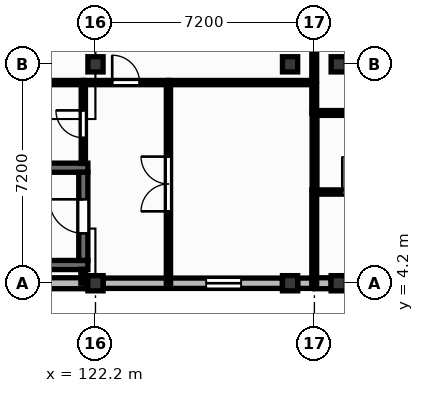
"""IFC4 building model, lengths in metres.
Left out: names, types, materials, properties, quantities, classifications, styles, units other than length and angle.
Written with IfcOpenShell. Run it as: python <this file> out.ifc"""

import sys

from ifc_helpers import new_model, si_unit, direction, frame, frame_2d, origin, origin_2d, place, context, subcontext, project, spatial, rectangle, extrude, element, fill, save


model = new_model("IFC4")
c1 = context("Model", 3, precision=1e-05, world=origin(), true_north=direction((0.0, 1.0)))
c2 = subcontext(c1, "Body", "Model", "MODEL_VIEW")
j1 = project(units=[si_unit("LENGTHUNIT", "METRE"), si_unit("PLANEANGLEUNIT", "RADIAN")], contexts=[c1])
p1 = place(None, origin())
s1 = spatial("IfcSite", under=j1, at=p1, CompositionType="ELEMENT")
p2 = place(p1, origin())
s2 = spatial("IfcBuilding", under=s1, at=p2, CompositionType="ELEMENT")
p3 = place(p2, frame((0.0, 0.0, 4.5)))
s3 = spatial("IfcBuildingStorey", under=s2, at=p3, CompositionType="ELEMENT", Elevation=4.5)
for number, where, z_axis, x_axis in (
    (1, (122.2, 4.2, 0.0), (0.0, 0.0, 1.0), (1.0, 0.0, 0.0)),
    (2, (122.2, 11.4, 0.0), (0.0, 0.0, 1.0), (1.0, 0.0, 0.0)),
    (3, (128.6, 4.2, 0.0), (0.0, 0.0, 1.0), (1.0, 0.0, 0.0)),
    (4, (128.6, 11.4, 0.0), (0.0, 0.0, 1.0), (1.0, 0.0, 0.0)),
    (5, (130.2, 4.2, 0.0), (0.0, 0.0, 1.0), (1.0, 0.0, 0.0)),
    (6, (130.2, 11.4, 0.0), (0.0, 0.0, 1.0), (1.0, 0.0, 0.0)),
):
    element("IfcColumn", number, at=place(p3, frame(where, z_axis=z_axis, x_axis=x_axis)), inside=s3, PredefinedType="COLUMN", context=c2, shape_type="SweptSolid", body=[
        extrude(rectangle(XDim=0.5, YDim=0.5, at=origin_2d()), origin(), (0.0, 0.0, 1.0), 4.22),
    ])
p4 = place(p3, frame((115.25, 4.2, 0.0), z_axis=(0.0, 0.0, 1.0), x_axis=(1.0, 0.0, 0.0)))
e7 = element("IfcWall", 7, at=p4, inside=s3, PredefinedType="SOLIDWALL", context=c2, shape_type="SweptSolid", body=[
    extrude(rectangle(XDim=6.7, YDim=0.36, at=frame_2d((3.35, 0.0))), origin(), (0.0, 0.0, 1.0), 3.52),
])
p5 = place(p3, frame((122.45, 4.2, 0.0), z_axis=(0.0, 0.0, 1.0), x_axis=(1.0, 0.0, 0.0)))
e8 = element("IfcWall", 8, at=p5, inside=s3, PredefinedType="SOLIDWALL", context=c2, shape_type="SweptSolid", body=[
    extrude(rectangle(XDim=5.9, YDim=0.34, at=frame_2d((2.95, 0.0))), origin(), (0.0, 0.0, 1.0), 3.52),
])
p6 = place(p5, frame((3.39, 0.0, 1.5)))
e9 = element("IfcOpeningElement", 9, at=p6, cuts=e8, PredefinedType="OPENING", context=c2, shape_type="SweptSolid", body=[
    extrude(rectangle(XDim=1.15, YDim=1.25, at=frame_2d((0.575, 0.625))), frame((0.0, 0.18, 0.0), z_axis=(0.0, -1.0, 0.0), x_axis=(1.0, 0.0, 0.0)), (0.0, 0.0, 1.0), 0.36),
])
p7 = place(p3, frame((128.85, 4.2, 0.0), z_axis=(0.0, 0.0, 1.0), x_axis=(1.0, 0.0, 0.0)))
e10 = element("IfcWall", 10, at=p7, inside=s3, PredefinedType="SOLIDWALL", context=c2, shape_type="SweptSolid", body=[
    extrude(rectangle(XDim=0.485, YDim=0.34, at=frame_2d((0.242, 0.0))), origin(), (0.0, 0.0, 1.0), 4.22),
])
p8 = place(p3, frame((129.405, 4.2, 0.0), z_axis=(0.0, 0.0, 1.0), x_axis=(1.0, 0.0, 0.0)))
e11 = element("IfcWall", 11, at=p8, inside=s3, PredefinedType="SOLIDWALL", context=c2, shape_type="SweptSolid", body=[
    extrude(rectangle(XDim=0.545, YDim=0.36, at=frame_2d((0.272, 0.0))), origin(), (0.0, 0.0, 1.0), 4.22),
])
for number, where, z_axis, x_axis in (
    (12, (115.25, 4.8, 0.0), (0.0, 0.0, 1.0), (1.0, 0.0, 0.0)),
    (13, (115.25, 8.0, 0.0), (0.0, 0.0, 1.0), (1.0, 0.0, 0.0)),
):
    element("IfcWall", number, at=place(p3, frame(where, z_axis=z_axis, x_axis=x_axis)), inside=s3, PredefinedType="SHEAR", context=c2, shape_type="SweptSolid", body=[
        extrude(rectangle(XDim=6.7, YDim=0.3, at=frame_2d((3.35, 0.0))), origin(), (0.0, 0.0, 1.0), 4.25),
    ])
p9 = place(p3, frame((121.8, 4.95, 0.0), z_axis=(0.0, 0.0, 1.0), x_axis=(0.0, 1.0, 0.0)))
e14 = element("IfcWall", 14, at=p9, inside=s3, PredefinedType="SHEAR", context=c2, shape_type="SweptSolid", body=[
    extrude(rectangle(XDim=2.9, YDim=0.3, at=frame_2d((1.45, 0.0))), origin(), (0.0, 0.0, 1.0), 4.25),
])
p10 = place(p9, frame((0.89, 0.0, 0.0)))
e15 = element("IfcOpeningElement", 15, at=p10, cuts=e14, PredefinedType="OPENING", context=c2, shape_type="SweptSolid", body=[
    extrude(rectangle(XDim=1.12, YDim=2.1, at=frame_2d((0.56, 1.05))), frame((0.0, 0.16, 0.0), z_axis=(0.0, -1.0, 0.0), x_axis=(1.0, 0.0, 0.0)), (0.0, 0.0, 1.0), 0.32),
])
p11 = place(p3, frame((115.0, 10.8, 0.0), z_axis=(0.0, 0.0, 1.0), x_axis=(1.0, 0.0, 0.0)))
e16 = element("IfcWall", 16, at=p11, inside=s3, PredefinedType="PARTITIONING", context=c2, shape_type="SweptSolid", body=[
    extrude(rectangle(XDim=6.8, YDim=0.14, at=frame_2d((3.4, 0.0))), origin(), (0.0, 0.0, 1.0), 4.18),
])
p12 = place(p11, frame((2.95, 0.0, 0.0)))
e17 = element("IfcOpeningElement", 17, at=p12, cuts=e16, PredefinedType="OPENING", context=c2, shape_type="SweptSolid", body=[
    extrude(rectangle(XDim=0.9, YDim=2.1, at=frame_2d((0.45, 1.05))), frame((0.0, 0.08, 0.0), z_axis=(0.0, -1.0, 0.0), x_axis=(1.0, 0.0, 0.0)), (0.0, 0.0, 1.0), 0.16),
])
p13 = place(p3, frame((121.8, 8.14, 0.0), z_axis=(0.0, 0.0, 1.0), x_axis=(0.0, 1.0, 0.0)))
e18 = element("IfcWall", 18, at=p13, inside=s3, PredefinedType="PARTITIONING", context=c2, shape_type="SweptSolid", body=[
    extrude(rectangle(XDim=2.59, YDim=0.14, at=frame_2d((1.295, 0.0))), origin(), (0.0, 0.0, 1.0), 4.18),
])
p14 = place(p13, frame((0.845, 0.0, 0.0)))
e19 = element("IfcOpeningElement", 19, at=p14, cuts=e18, PredefinedType="OPENING", context=c2, shape_type="SweptSolid", body=[
    extrude(rectangle(XDim=0.9, YDim=2.1, at=frame_2d((0.45, 1.05))), frame((0.0, 0.08, 0.0), z_axis=(0.0, -1.0, 0.0), x_axis=(1.0, 0.0, 0.0)), (0.0, 0.0, 1.0), 0.16),
])
p15 = place(p3, frame((121.8, 10.8, 0.0), z_axis=(0.0, 0.0, 1.0), x_axis=(1.0, 0.0, 0.0)))
e20 = element("IfcWall", 20, at=p15, inside=s3, PredefinedType="PARTITIONING", context=c2, shape_type="SweptSolid", body=[
    extrude(rectangle(XDim=2.8, YDim=0.14, at=frame_2d((1.4, 0.0))), origin(), (0.0, 0.0, 1.0), 4.18),
])
p16 = place(p15, frame((0.95, 0.0, 0.0)))
e21 = element("IfcOpeningElement", 21, at=p16, cuts=e20, PredefinedType="OPENING", context=c2, shape_type="SweptSolid", body=[
    extrude(rectangle(XDim=0.9, YDim=2.1, at=frame_2d((0.45, 1.05))), frame((0.0, 0.08, 0.0), z_axis=(0.0, -1.0, 0.0), x_axis=(1.0, 0.0, 0.0)), (0.0, 0.0, 1.0), 0.16),
])
p17 = place(p3, frame((124.6, 4.2, 0.0), z_axis=(0.0, 0.0, 1.0), x_axis=(0.0, 1.0, 0.0)))
e22 = element("IfcWall", 22, at=p17, inside=s3, PredefinedType="PARTITIONING", context=c2, shape_type="SweptSolid", body=[
    extrude(rectangle(XDim=6.53, YDim=0.14, at=frame_2d((3.265, 0.0))), origin(), (0.0, 0.0, 1.0), 4.18),
])
p18 = place(p17, frame((2.365, 0.0, 0.0)))
e23 = element("IfcOpeningElement", 23, at=p18, cuts=e22, PredefinedType="OPENING", context=c2, shape_type="SweptSolid", body=[
    extrude(rectangle(XDim=1.8, YDim=2.3, at=frame_2d((0.9, 1.15))), frame((0.0, 0.08, 0.0), z_axis=(0.0, -1.0, 0.0), x_axis=(1.0, 0.0, 0.0)), (0.0, 0.0, 1.0), 0.16),
])
p19 = place(p3, frame((124.6, 10.8, 0.0), z_axis=(0.0, 0.0, 1.0), x_axis=(1.0, 0.0, 0.0)))
e24 = element("IfcWall", 24, at=p19, inside=s3, PredefinedType="PARTITIONING", context=c2, shape_type="SweptSolid", body=[
    extrude(rectangle(XDim=4.795, YDim=0.14, at=frame_2d((2.397, 0.0))), origin(), (0.0, 0.0, 1.0), 4.18),
])
p20 = place(p3, frame((129.405, 7.2, 0.0), z_axis=(0.0, 0.0, 1.0), x_axis=(1.0, 0.0, 0.0)))
e25 = element("IfcWall", 25, at=p20, inside=s3, PredefinedType="PARTITIONING", context=c2, shape_type="SweptSolid", body=[
    extrude(rectangle(XDim=2.986, YDim=0.14, at=frame_2d((1.493, 0.0))), origin(), (0.0, 0.0, 1.0), 4.18),
])
p21 = place(p20, frame((0.913, 0.0, 0.0)))
e26 = element("IfcOpeningElement", 26, at=p21, cuts=e25, PredefinedType="OPENING", context=c2, shape_type="SweptSolid", body=[
    extrude(rectangle(XDim=1.16, YDim=2.1, at=frame_2d((0.58, 1.05))), frame((0.0, 0.08, 0.0), z_axis=(0.0, -1.0, 0.0), x_axis=(1.0, 0.0, 0.0)), (0.0, 0.0, 1.0), 0.16),
])
p22 = place(p3, frame((129.395, 10.87, 0.0), z_axis=(0.0, 0.0, 1.0), x_axis=(0.0, 1.0, 0.0)))
e27 = element("IfcWall", 27, at=p22, inside=s3, PredefinedType="PARTITIONING", context=c2, shape_type="SweptSolid", body=[
    extrude(rectangle(XDim=2.53, YDim=0.16, at=frame_2d((1.265, 0.0))), origin(), (0.0, 0.0, 1.0), 4.18),
])
p23 = place(p3, frame((121.8, 4.2, 0.0), z_axis=(0.0, 0.0, 1.0), x_axis=(0.0, 1.0, 0.0)))
e28 = element("IfcWall", 28, at=p23, inside=s3, PredefinedType="PARTITIONING", context=c2, shape_type="SweptSolid", body=[
    extrude(rectangle(XDim=0.46, YDim=0.16, at=frame_2d((0.23, 0.0))), origin(), (0.0, 0.0, 1.0), 4.18),
])
p24 = place(p3, frame((133.8, 9.8, 0.0), z_axis=(0.0, 0.0, 1.0), x_axis=(-1.0, 0.0, 0.0)))
e29 = element("IfcWall", 29, at=p24, inside=s3, PredefinedType="PARTITIONING", context=c2, shape_type="SweptSolid", body=[
    extrude(rectangle(XDim=4.395, YDim=0.16, at=frame_2d((2.198, 0.0))), origin(), (0.0, 0.0, 1.0), 4.18),
])
p25 = place(p3, frame((129.405, 7.27, 0.0), z_axis=(0.0, 0.0, 1.0), x_axis=(0.0, 1.0, 0.0)))
e30 = element("IfcWall", 30, at=p25, inside=s3, PredefinedType="PARTITIONING", context=c2, shape_type="SweptSolid", body=[
    extrude(rectangle(XDim=2.53, YDim=0.16, at=frame_2d((1.265, 0.0))), origin(), (0.0, 0.0, 1.0), 4.18),
])
p26 = place(p3, frame((129.395, 4.2, 0.0), z_axis=(0.0, 0.0, 1.0), x_axis=(0.0, 1.0, 0.0)))
e31 = element("IfcWall", 31, at=p26, inside=s3, PredefinedType="PARTITIONING", context=c2, shape_type="SweptSolid", body=[
    extrude(rectangle(XDim=3.07, YDim=0.16, at=frame_2d((1.535, 0.0))), origin(), (0.0, 0.0, 1.0), 4.18),
])
p27 = place(p3, frame((129.395, 9.8, 0.0), z_axis=(0.0, 0.0, 1.0), x_axis=(0.0, 1.0, 0.0)))
e32 = element("IfcWall", 32, at=p27, inside=s3, PredefinedType="PARTITIONING", context=c2, shape_type="SweptSolid", body=[
    extrude(rectangle(XDim=0.93, YDim=0.16, at=frame_2d((0.465, 0.0))), origin(), (0.0, 0.0, 1.0), 4.18),
])
p28 = place(p6, origin())
e33 = element("IfcWindow", 33, at=p28, inside=s3, PartitioningType="SINGLE_PANEL", PredefinedType="WINDOW", context=c2, shape_type="SweptSolid", body=[
    extrude(rectangle(XDim=1.15, YDim=1.25, at=frame_2d((0.575, 0.625))), frame((0.0, 0.03, 0.0), z_axis=(0.0, -1.0, 0.0), x_axis=(1.0, 0.0, 0.0)), (0.0, 0.0, 1.0), 0.06),
])
fill(e9, e33)
p29 = place(p10, origin())
e34 = element("IfcDoor", 34, at=p29, inside=s3, OperationType="SINGLE_SWING_RIGHT", PredefinedType="DOOR", context=c2, shape_type="SweptSolid", body=[
    extrude(rectangle(XDim=1.12, YDim=2.1, at=frame_2d((0.56, 1.05))), frame((0.0, 0.025, 0.0), z_axis=(0.0, -1.0, 0.0), x_axis=(1.0, 0.0, 0.0)), (0.0, 0.0, 1.0), 0.05),
])
fill(e15, e34)
p30 = place(p16, origin())
e35 = element("IfcDoor", 35, at=p30, inside=s3, OperationType="SINGLE_SWING_LEFT", PredefinedType="DOOR", context=c2, shape_type="SweptSolid", body=[
    extrude(rectangle(XDim=0.9, YDim=2.1, at=frame_2d((0.45, 1.05))), frame((0.0, 0.025, 0.0), z_axis=(0.0, -1.0, 0.0), x_axis=(1.0, 0.0, 0.0)), (0.0, 0.0, 1.0), 0.05),
])
fill(e21, e35)
p31 = place(p14, origin())
e36 = element("IfcDoor", 36, at=p31, inside=s3, OperationType="SINGLE_SWING_RIGHT", PredefinedType="DOOR", context=c2, shape_type="SweptSolid", body=[
    extrude(rectangle(XDim=0.9, YDim=2.1, at=frame_2d((0.45, 1.05))), frame((0.0, 0.025, 0.0), z_axis=(0.0, -1.0, 0.0), x_axis=(1.0, 0.0, 0.0)), (0.0, 0.0, 1.0), 0.05),
])
fill(e19, e36)
p32 = place(p18, origin())
e37 = element("IfcDoor", 37, at=p32, inside=s3, OperationType="DOUBLE_DOOR_SINGLE_SWING", PredefinedType="DOOR", context=c2, shape_type="SweptSolid", body=[
    extrude(rectangle(XDim=1.8, YDim=2.3, at=frame_2d((0.9, 1.15))), frame((0.0, 0.025, 0.0), z_axis=(0.0, -1.0, 0.0), x_axis=(1.0, 0.0, 0.0)), (0.0, 0.0, 1.0), 0.05),
])
fill(e23, e37)
p33 = place(p21, origin())
e38 = element("IfcDoor", 38, at=p33, inside=s3, OperationType="SINGLE_SWING_LEFT", PredefinedType="DOOR", context=c2, shape_type="SweptSolid", body=[
    extrude(rectangle(XDim=1.16, YDim=2.1, at=frame_2d((0.58, 1.05))), frame((0.0, 0.025, 0.0), z_axis=(0.0, -1.0, 0.0), x_axis=(1.0, 0.0, 0.0)), (0.0, 0.0, 1.0), 0.05),
])
fill(e26, e38)
save(model, sys.argv[1])
